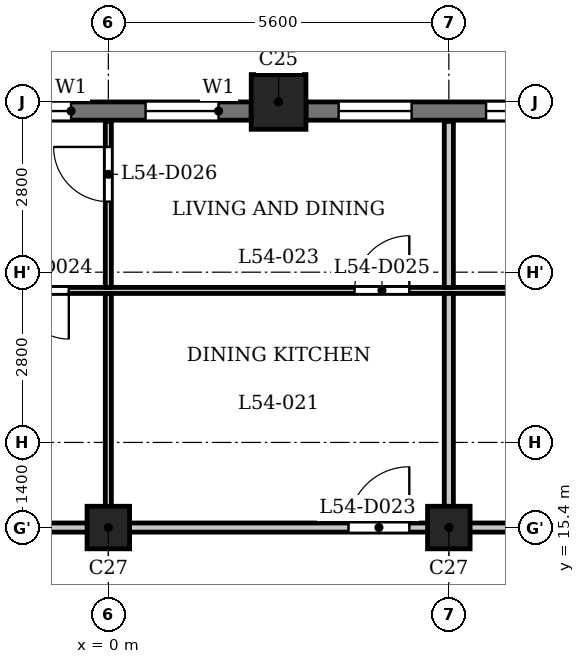
"""IFC4 building model, lengths in metres.
Left out: names, types, materials, properties, quantities, classifications, styles, units other than length and angle.
Written with IfcOpenShell. Run it as: python <this file> out.ifc"""

import sys

from ifc_helpers import new_model, si_unit, direction, frame, frame_2d, origin, origin_2d, place, context, subcontext, project, spatial, rectangle, extrude, element, fill, save


model = new_model("IFC4")
c1 = context("Model", 3, precision=1e-05, world=origin(), true_north=direction((0.0, 1.0)))
c2 = subcontext(c1, "Body", "Model", "MODEL_VIEW")
j1 = project(units=[si_unit("LENGTHUNIT", "METRE"), si_unit("PLANEANGLEUNIT", "RADIAN")], contexts=[c1])
p1 = place(None, origin())
s1 = spatial("IfcSite", under=j1, at=p1, CompositionType="ELEMENT")
p2 = place(p1, origin())
s2 = spatial("IfcBuilding", under=s1, at=p2, CompositionType="ELEMENT")
p3 = place(p2, frame((0.0, 0.0, 209.9)))
s3 = spatial("IfcBuildingStorey", under=s2, at=p3, CompositionType="ELEMENT", Elevation=209.9)
p4 = place(p3, frame((2.8, 22.4, 0.0), z_axis=(0.0, 0.0, 1.0), x_axis=(1.0, 0.0, 0.0)))
e1 = element("IfcColumn", 1, at=p4, inside=s3, PredefinedType="COLUMN", context=c2, shape_type="SweptSolid", body=[
    extrude(rectangle(XDim=0.9, YDim=0.9, at=origin_2d()), origin(), (0.0, 0.0, 1.0), 3.5),
])
for number, where, z_axis, x_axis in (
    (2, (0.0, 15.4, 0.0), (0.0, 0.0, 1.0), (1.0, 0.0, 0.0)),
    (3, (5.6, 15.4, 0.0), (0.0, 0.0, 1.0), (1.0, 0.0, 0.0)),
):
    element("IfcColumn", number, at=place(p3, frame(where, z_axis=z_axis, x_axis=x_axis)), inside=s3, PredefinedType="COLUMN", context=c2, shape_type="SweptSolid", body=[
        extrude(rectangle(XDim=0.7, YDim=0.7, at=origin_2d()), origin(), (0.0, 0.0, 1.0), 3.5),
    ])
p5 = place(p3, frame((7.95, 22.25, 0.0), z_axis=(0.0, 0.0, 1.0), x_axis=(-1.0, 0.0, 0.0)))
e4 = element("IfcWall", 4, at=p5, inside=s3, PredefinedType="SOLIDWALL", context=c2, shape_type="SweptSolid", body=[
    extrude(rectangle(XDim=4.7, YDim=0.3, at=frame_2d((2.35, 0.0))), origin(), (0.0, 0.0, 1.0), 2.5),
])
p6 = place(p5, frame((0.538, 0.0, 0.6)))
e5 = element("IfcOpeningElement", 5, at=p6, cuts=e4, PredefinedType="OPENING", context=c2, shape_type="SweptSolid", body=[
    extrude(rectangle(XDim=1.2, YDim=1.55, at=frame_2d((0.6, 0.775))), frame((0.0, 0.16, 0.0), z_axis=(0.0, -1.0, 0.0), x_axis=(1.0, 0.0, 0.0)), (0.0, 0.0, 1.0), 0.32),
])
p7 = place(p5, frame((2.962, 0.0, 0.6)))
e6 = element("IfcOpeningElement", 6, at=p7, cuts=e4, PredefinedType="OPENING", context=c2, shape_type="SweptSolid", body=[
    extrude(rectangle(XDim=1.2, YDim=1.55, at=frame_2d((0.6, 0.775))), frame((0.0, 0.16, 0.0), z_axis=(0.0, -1.0, 0.0), x_axis=(1.0, 0.0, 0.0)), (0.0, 0.0, 1.0), 0.32),
])
p8 = place(p3, frame((2.35, 22.25, 0.0), z_axis=(0.0, 0.0, 1.0), x_axis=(-1.0, 0.0, 0.0)))
e7 = element("IfcWall", 7, at=p8, inside=s3, PredefinedType="SOLIDWALL", context=c2, shape_type="SweptSolid", body=[
    extrude(rectangle(XDim=4.7, YDim=0.3, at=frame_2d((2.35, 0.0))), origin(), (0.0, 0.0, 1.0), 2.5),
])
p9 = place(p8, frame((0.538, 0.0, 0.6)))
e8 = element("IfcOpeningElement", 8, at=p9, cuts=e7, PredefinedType="OPENING", context=c2, shape_type="SweptSolid", body=[
    extrude(rectangle(XDim=1.2, YDim=1.55, at=frame_2d((0.6, 0.775))), frame((0.0, 0.16, 0.0), z_axis=(0.0, -1.0, 0.0), x_axis=(1.0, 0.0, 0.0)), (0.0, 0.0, 1.0), 0.32),
])
p10 = place(p8, frame((2.962, 0.0, 0.6)))
e9 = element("IfcOpeningElement", 9, at=p10, cuts=e7, PredefinedType="OPENING", context=c2, shape_type="SweptSolid", body=[
    extrude(rectangle(XDim=1.2, YDim=1.55, at=frame_2d((0.6, 0.775))), frame((0.0, 0.16, 0.0), z_axis=(0.0, -1.0, 0.0), x_axis=(1.0, 0.0, 0.0)), (0.0, 0.0, 1.0), 0.32),
])
p11 = place(p3, frame((-24.684, 15.4, 0.0), z_axis=(0.0, 0.0, 1.0), x_axis=(1.0, 0.0, 0.0)))
e10 = element("IfcWall", 10, at=p11, inside=s3, PredefinedType="PARTITIONING", context=c2, shape_type="SweptSolid", body=[
    extrude(rectangle(XDim=49.368, YDim=0.15, at=frame_2d((24.684, 0.0))), origin(), (0.0, 0.0, 1.0), 3.2),
])
p12 = place(p11, frame((17.434, 0.0, 0.0)))
e11 = element("IfcOpeningElement", 11, at=p12, cuts=e10, PredefinedType="OPENING", context=c2, shape_type="SweptSolid", body=[
    extrude(rectangle(XDim=1.0, YDim=2.1, at=frame_2d((0.5, 1.05))), frame((0.0, 0.085, 0.0), z_axis=(0.0, -1.0, 0.0), x_axis=(1.0, 0.0, 0.0)), (0.0, 0.0, 1.0), 0.17),
])
p13 = place(p11, frame((28.634, 0.0, 0.0)))
e12 = element("IfcOpeningElement", 12, at=p13, cuts=e10, PredefinedType="OPENING", context=c2, shape_type="SweptSolid", body=[
    extrude(rectangle(XDim=1.0, YDim=2.1, at=frame_2d((0.5, 1.05))), frame((0.0, 0.085, 0.0), z_axis=(0.0, -1.0, 0.0), x_axis=(1.0, 0.0, 0.0)), (0.0, 0.0, 1.0), 0.17),
])
p14 = place(p11, frame((47.225, 0.0, 0.0)))
e13 = element("IfcOpeningElement", 13, at=p14, cuts=e10, PredefinedType="OPENING", context=c2, shape_type="SweptSolid", body=[
    extrude(rectangle(XDim=1.0, YDim=2.1, at=frame_2d((0.5, 1.05))), frame((0.0, 0.085, 0.0), z_axis=(0.0, -1.0, 0.0), x_axis=(1.0, 0.0, 0.0)), (0.0, 0.0, 1.0), 0.17),
])
p15 = place(p3, frame((-22.256, 19.3, 0.0), z_axis=(0.0, 0.0, 1.0), x_axis=(1.0, 0.0, 0.0)))
e14 = element("IfcWall", 14, at=p15, inside=s3, PredefinedType="PARTITIONING", context=c2, shape_type="SweptSolid", body=[
    extrude(rectangle(XDim=44.511, YDim=0.1, at=frame_2d((22.256, 0.0))), origin(), (0.0, 0.0, 1.0), 3.2),
])
p16 = place(p15, frame((11.606, 0.0, 0.0)))
e15 = element("IfcOpeningElement", 15, at=p16, cuts=e14, PredefinedType="OPENING", context=c2, shape_type="SweptSolid", body=[
    extrude(rectangle(XDim=0.9, YDim=2.1, at=frame_2d((0.45, 1.05))), frame((0.0, 0.06, 0.0), z_axis=(0.0, -1.0, 0.0), x_axis=(1.0, 0.0, 0.0)), (0.0, 0.0, 1.0), 0.12),
])
p17 = place(p15, frame((9.506, 0.0, 0.0)))
e16 = element("IfcOpeningElement", 16, at=p17, cuts=e14, PredefinedType="OPENING", context=c2, shape_type="SweptSolid", body=[
    extrude(rectangle(XDim=0.9, YDim=2.1, at=frame_2d((0.45, 1.05))), frame((0.0, 0.06, 0.0), z_axis=(0.0, -1.0, 0.0), x_axis=(1.0, 0.0, 0.0)), (0.0, 0.0, 1.0), 0.12),
])
p18 = place(p15, frame((20.806, 0.0, 0.0)))
e17 = element("IfcOpeningElement", 17, at=p18, cuts=e14, PredefinedType="OPENING", context=c2, shape_type="SweptSolid", body=[
    extrude(rectangle(XDim=0.8, YDim=2.1, at=frame_2d((0.4, 1.05))), frame((0.0, 0.06, 0.0), z_axis=(0.0, -1.0, 0.0), x_axis=(1.0, 0.0, 0.0)), (0.0, 0.0, 1.0), 0.12),
])
p19 = place(p15, frame((26.306, 0.0, 0.0)))
e18 = element("IfcOpeningElement", 18, at=p19, cuts=e14, PredefinedType="OPENING", context=c2, shape_type="SweptSolid", body=[
    extrude(rectangle(XDim=0.9, YDim=2.1, at=frame_2d((0.45, 1.05))), frame((0.0, 0.06, 0.0), z_axis=(0.0, -1.0, 0.0), x_axis=(1.0, 0.0, 0.0)), (0.0, 0.0, 1.0), 0.12),
])
p20 = place(p15, frame((40.278, 0.0, 0.0)))
e19 = element("IfcOpeningElement", 19, at=p20, cuts=e14, PredefinedType="OPENING", context=c2, shape_type="SweptSolid", body=[
    extrude(rectangle(XDim=0.9, YDim=2.1, at=frame_2d((0.45, 1.05))), frame((0.0, 0.06, 0.0), z_axis=(0.0, -1.0, 0.0), x_axis=(1.0, 0.0, 0.0)), (0.0, 0.0, 1.0), 0.12),
])
p21 = place(p15, frame((36.756, 0.0, 0.0)))
e20 = element("IfcOpeningElement", 20, at=p21, cuts=e14, PredefinedType="OPENING", context=c2, shape_type="SweptSolid", body=[
    extrude(rectangle(XDim=0.9, YDim=2.1, at=frame_2d((0.45, 1.05))), frame((0.0, 0.06, 0.0), z_axis=(0.0, -1.0, 0.0), x_axis=(1.0, 0.0, 0.0)), (0.0, 0.0, 1.0), 0.12),
])
p22 = place(p3, frame((0.0, 15.475, 0.0), z_axis=(0.0, 0.0, 1.0), x_axis=(0.0, 1.0, 0.0)))
e21 = element("IfcWall", 21, at=p22, inside=s3, PredefinedType="PARTITIONING", context=c2, shape_type="SweptSolid", body=[
    extrude(rectangle(XDim=3.775, YDim=0.1, at=frame_2d((1.887, 0.0))), origin(), (0.0, 0.0, 1.0), 3.2),
])
p23 = place(p3, frame((0.0, 19.35, 0.0), z_axis=(0.0, 0.0, 1.0), x_axis=(0.0, 1.0, 0.0)))
e22 = element("IfcWall", 22, at=p23, inside=s3, PredefinedType="PARTITIONING", context=c2, shape_type="SweptSolid", body=[
    extrude(rectangle(XDim=2.73, YDim=0.1, at=frame_2d((1.365, 0.0))), origin(), (0.0, 0.0, 1.0), 3.2),
])
p24 = place(p23, frame((1.41, 0.0, 0.0)))
e23 = element("IfcOpeningElement", 23, at=p24, cuts=e22, PredefinedType="OPENING", context=c2, shape_type="SweptSolid", body=[
    extrude(rectangle(XDim=0.9, YDim=2.1, at=frame_2d((0.45, 1.05))), frame((0.0, 0.06, 0.0), z_axis=(0.0, -1.0, 0.0), x_axis=(1.0, 0.0, 0.0)), (0.0, 0.0, 1.0), 0.12),
])
p25 = place(p3, frame((5.6, 15.475, 0.0), z_axis=(0.0, 0.0, 1.0), x_axis=(0.0, 1.0, 0.0)))
e24 = element("IfcWall", 24, at=p25, inside=s3, PredefinedType="PARTITIONING", context=c2, shape_type="SweptSolid", body=[
    extrude(rectangle(XDim=3.775, YDim=0.15, at=frame_2d((1.887, 0.0))), origin(), (0.0, 0.0, 1.0), 3.2),
])
p26 = place(p3, frame((5.6, 19.35, 0.0), z_axis=(0.0, 0.0, 1.0), x_axis=(0.0, 1.0, 0.0)))
e25 = element("IfcWall", 25, at=p26, inside=s3, PredefinedType="PARTITIONING", context=c2, shape_type="SweptSolid", body=[
    extrude(rectangle(XDim=2.73, YDim=0.15, at=frame_2d((1.365, 0.0))), origin(), (0.0, 0.0, 1.0), 3.2),
])
p27 = place(p13, origin())
e26 = element("IfcDoor", 26, at=p27, inside=s3, OperationType="SINGLE_SWING_LEFT", PredefinedType="DOOR", context=c2, shape_type="SweptSolid", body=[
    extrude(rectangle(XDim=1.0, YDim=2.1, at=frame_2d((0.5, 1.05))), frame((0.0, 0.025, 0.0), z_axis=(0.0, -1.0, 0.0), x_axis=(1.0, 0.0, 0.0)), (0.0, 0.0, 1.0), 0.05),
])
fill(e12, e26)
p28 = place(p18, origin())
e27 = element("IfcDoor", 27, at=p28, inside=s3, OperationType="SINGLE_SWING_RIGHT", PredefinedType="DOOR", context=c2, shape_type="SweptSolid", body=[
    extrude(rectangle(XDim=0.8, YDim=2.1, at=frame_2d((0.4, 1.05))), frame((0.0, 0.025, 0.0), z_axis=(0.0, -1.0, 0.0), x_axis=(1.0, 0.0, 0.0)), (0.0, 0.0, 1.0), 0.05),
])
fill(e17, e27)
p29 = place(p19, origin())
e28 = element("IfcDoor", 28, at=p29, inside=s3, OperationType="SINGLE_SWING_LEFT", PredefinedType="DOOR", context=c2, shape_type="SweptSolid", body=[
    extrude(rectangle(XDim=0.9, YDim=2.1, at=frame_2d((0.45, 1.05))), frame((0.0, 0.025, 0.0), z_axis=(0.0, -1.0, 0.0), x_axis=(1.0, 0.0, 0.0)), (0.0, 0.0, 1.0), 0.05),
])
fill(e18, e28)
p30 = place(p24, origin())
e29 = element("IfcDoor", 29, at=p30, inside=s3, OperationType="SINGLE_SWING_LEFT", PredefinedType="DOOR", context=c2, shape_type="SweptSolid", body=[
    extrude(rectangle(XDim=0.9, YDim=2.1, at=frame_2d((0.45, 1.05))), frame((0.0, 0.025, 0.0), z_axis=(0.0, -1.0, 0.0), x_axis=(1.0, 0.0, 0.0)), (0.0, 0.0, 1.0), 0.05),
])
fill(e23, e29)
p31 = place(p6, origin())
e30 = element("IfcWindow", 30, at=p31, inside=s3, PartitioningType="SINGLE_PANEL", PredefinedType="WINDOW", context=c2, shape_type="SweptSolid", body=[
    extrude(rectangle(XDim=1.2, YDim=1.55, at=frame_2d((0.6, 0.775))), frame((0.0, 0.03, 0.0), z_axis=(0.0, -1.0, 0.0), x_axis=(1.0, 0.0, 0.0)), (0.0, 0.0, 1.0), 0.06),
])
fill(e5, e30)
p32 = place(p7, origin())
e31 = element("IfcWindow", 31, at=p32, inside=s3, PartitioningType="SINGLE_PANEL", PredefinedType="WINDOW", context=c2, shape_type="SweptSolid", body=[
    extrude(rectangle(XDim=1.2, YDim=1.55, at=frame_2d((0.6, 0.775))), frame((0.0, 0.03, 0.0), z_axis=(0.0, -1.0, 0.0), x_axis=(1.0, 0.0, 0.0)), (0.0, 0.0, 1.0), 0.06),
])
fill(e6, e31)
p33 = place(p9, origin())
e32 = element("IfcWindow", 32, at=p33, inside=s3, PartitioningType="SINGLE_PANEL", PredefinedType="WINDOW", context=c2, shape_type="SweptSolid", body=[
    extrude(rectangle(XDim=1.2, YDim=1.55, at=frame_2d((0.6, 0.775))), frame((0.0, 0.03, 0.0), z_axis=(0.0, -1.0, 0.0), x_axis=(1.0, 0.0, 0.0)), (0.0, 0.0, 1.0), 0.06),
])
fill(e8, e32)
p34 = place(p10, origin())
e33 = element("IfcWindow", 33, at=p34, inside=s3, PartitioningType="SINGLE_PANEL", PredefinedType="WINDOW", context=c2, shape_type="SweptSolid", body=[
    extrude(rectangle(XDim=1.2, YDim=1.55, at=frame_2d((0.6, 0.775))), frame((0.0, 0.03, 0.0), z_axis=(0.0, -1.0, 0.0), x_axis=(1.0, 0.0, 0.0)), (0.0, 0.0, 1.0), 0.06),
])
fill(e9, e33)
save(model, sys.argv[1])
